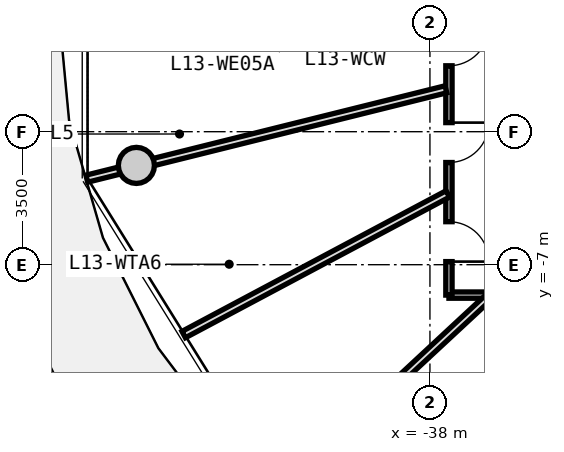
"""IFC4 building model, lengths in metres.
Left out: names, types, materials, properties, quantities, classifications, styles, units other than length and angle.
Written with IfcOpenShell. Run it as: python <this file> out.ifc"""

import sys

from ifc_helpers import new_model, si_unit, direction, frame, frame_2d, origin, origin_2d, place, context, subcontext, project, spatial, rectangle, circle, extrude, source, transform, mapped, element, fill, save


model = new_model("IFC4")
c1 = context("Model", 3, precision=1e-05, world=origin(), true_north=direction((0.0, 1.0)))
c2 = subcontext(c1, "Body", "Model", "MODEL_VIEW")
j1 = project(units=[si_unit("LENGTHUNIT", "METRE"), si_unit("PLANEANGLEUNIT", "RADIAN")], contexts=[c1])
p1 = place(None, origin())
s1 = spatial("IfcSite", under=j1, at=p1, CompositionType="ELEMENT")
p2 = place(p1, origin())
s2 = spatial("IfcBuilding", under=s1, at=p2, CompositionType="ELEMENT")
p3 = place(p2, frame((0.0, 0.0, 46.0)))
s3 = spatial("IfcBuildingStorey", under=s2, at=p3, CompositionType="ELEMENT", Elevation=46.0)
m1 = source(origin(), c2, "Body", "SweptSolid", [
    extrude(circle(Radius=0.475, at=origin_2d()), origin(), (0.0, 0.0, 1.0), 3.05),
])
p4 = place(p3, frame((-45.725, -4.387, 0.0), z_axis=(0.0, 0.0, 1.0), x_axis=(1.0, 0.0, 0.0)))
e1 = element("IfcColumn", 1, at=p4, inside=s3, PredefinedType="COLUMN", context=c2, shape_type="MappedRepresentation", body=[
    mapped(m1, transform((0.0, 0.0, 0.0), x_axis=(1.0, 0.0, 0.0), y_axis=(0.0, 1.0, 0.0), z_axis=(0.0, 0.0, 1.0), scale=1.0)),
])
m2 = source(origin(), c2, "Body", "SweptSolid", [
    extrude(rectangle(XDim=19.0, YDim=0.165, at=frame_2d((9.5, 0.0))), origin(), (0.0, 0.0, 1.0), 2.775),
])
p5 = place(p3, frame((-18.5, -7.8, 0.0), z_axis=(0.0, 0.0, 1.0), x_axis=(-1.0, 0.0, 0.0)))
e2 = element("IfcWall", 2, at=p5, inside=s3, PredefinedType="PARTITIONING", context=c2, shape_type="MappedRepresentation", body=[
    mapped(m2, transform((0.0, 0.0, 0.0), x_axis=(1.0, 0.0, 0.0), y_axis=(0.0, 1.0, 0.0), z_axis=(0.0, 0.0, 1.0), scale=1.0)),
])
p6 = place(p5, frame((15.652, 0.0, 0.0)))
e3 = element("IfcOpeningElement", 3, at=p6, cuts=e2, PredefinedType="OPENING", context=c2, shape_type="SweptSolid", body=[
    extrude(rectangle(XDim=1.05, YDim=2.15, at=frame_2d((0.525, 1.075))), frame((0.0, 0.093, 0.0), z_axis=(0.0, -1.0, 0.0), x_axis=(1.0, 0.0, 0.0)), (0.0, 0.0, 1.0), 0.185),
])
p7 = place(p5, frame((12.5, 0.0, 0.0)))
e4 = element("IfcOpeningElement", 4, at=p7, cuts=e2, PredefinedType="OPENING", context=c2, shape_type="SweptSolid", body=[
    extrude(rectangle(XDim=1.05, YDim=2.15, at=frame_2d((0.525, 1.075))), frame((0.0, 0.093, 0.0), z_axis=(0.0, -1.0, 0.0), x_axis=(1.0, 0.0, 0.0)), (0.0, 0.0, 1.0), 0.185),
])
p8 = place(p5, frame((10.104, 0.0, 0.0)))
e5 = element("IfcOpeningElement", 5, at=p8, cuts=e2, PredefinedType="OPENING", context=c2, shape_type="SweptSolid", body=[
    extrude(rectangle(XDim=1.05, YDim=2.15, at=frame_2d((0.525, 1.075))), frame((0.0, 0.093, 0.0), z_axis=(0.0, -1.0, 0.0), x_axis=(1.0, 0.0, 0.0)), (0.0, 0.0, 1.0), 0.185),
])
p9 = place(p5, frame((7.806, 0.0, 0.0)))
e6 = element("IfcOpeningElement", 6, at=p9, cuts=e2, PredefinedType="OPENING", context=c2, shape_type="SweptSolid", body=[
    extrude(rectangle(XDim=1.05, YDim=2.15, at=frame_2d((0.525, 1.075))), frame((0.0, 0.093, 0.0), z_axis=(0.0, -1.0, 0.0), x_axis=(1.0, 0.0, 0.0)), (0.0, 0.0, 1.0), 0.185),
])
p10 = place(p5, frame((5.915, 0.0, 0.0)))
e7 = element("IfcOpeningElement", 7, at=p10, cuts=e2, PredefinedType="OPENING", context=c2, shape_type="SweptSolid", body=[
    extrude(rectangle(XDim=0.92, YDim=2.1, at=frame_2d((0.46, 1.05))), frame((0.0, 0.093, 0.0), z_axis=(0.0, -1.0, 0.0), x_axis=(1.0, 0.0, 0.0)), (0.0, 0.0, 1.0), 0.185),
])
p11 = place(p5, frame((2.769, 0.0, 0.0)))
e8 = element("IfcOpeningElement", 8, at=p11, cuts=e2, PredefinedType="OPENING", context=c2, shape_type="SweptSolid", body=[
    extrude(rectangle(XDim=0.92, YDim=2.1, at=frame_2d((0.46, 1.05))), frame((0.0, 0.093, 0.0), z_axis=(0.0, -1.0, 0.0), x_axis=(1.0, 0.0, 0.0)), (0.0, 0.0, 1.0), 0.185),
])
m3 = source(origin(), c2, "Body", "SweptSolid", [
    extrude(rectangle(XDim=15.6, YDim=0.165, at=frame_2d((7.8, 0.0))), origin(), (0.0, 0.0, 1.0), 2.775),
])
p12 = place(p3, frame((-37.5, -7.8, 0.0), z_axis=(0.0, 0.0, 1.0), x_axis=(0.0, 1.0, 0.0)))
e9 = element("IfcWall", 9, at=p12, inside=s3, PredefinedType="PARTITIONING", context=c2, shape_type="MappedRepresentation", body=[
    mapped(m3, transform((0.0, 0.0, 0.0), x_axis=(1.0, 0.0, 0.0), y_axis=(0.0, 1.0, 0.0), z_axis=(0.0, 0.0, 1.0), scale=1.0)),
])
p13 = place(p12, frame((13.293, 0.0, 0.0)))
e10 = element("IfcOpeningElement", 10, at=p13, cuts=e9, PredefinedType="OPENING", context=c2, shape_type="SweptSolid", body=[
    extrude(rectangle(XDim=1.05, YDim=2.15, at=frame_2d((0.525, 1.075))), frame((0.0, 0.093, 0.0), z_axis=(0.0, -1.0, 0.0), x_axis=(1.0, 0.0, 0.0)), (0.0, 0.0, 1.0), 0.185),
])
p14 = place(p12, frame((11.018, 0.0, 0.0)))
e11 = element("IfcOpeningElement", 11, at=p14, cuts=e9, PredefinedType="OPENING", context=c2, shape_type="SweptSolid", body=[
    extrude(rectangle(XDim=1.05, YDim=2.15, at=frame_2d((0.525, 1.075))), frame((0.0, 0.093, 0.0), z_axis=(0.0, -1.0, 0.0), x_axis=(1.0, 0.0, 0.0)), (0.0, 0.0, 1.0), 0.185),
])
p15 = place(p12, frame((7.812, 0.0, 0.0)))
e12 = element("IfcOpeningElement", 12, at=p15, cuts=e9, PredefinedType="OPENING", context=c2, shape_type="SweptSolid", body=[
    extrude(rectangle(XDim=1.05, YDim=2.15, at=frame_2d((0.525, 1.075))), frame((0.0, 0.093, 0.0), z_axis=(0.0, -1.0, 0.0), x_axis=(1.0, 0.0, 0.0)), (0.0, 0.0, 1.0), 0.185),
])
p16 = place(p12, frame((6.035, 0.0, 0.0)))
e13 = element("IfcOpeningElement", 13, at=p16, cuts=e9, PredefinedType="OPENING", context=c2, shape_type="SweptSolid", body=[
    extrude(rectangle(XDim=1.05, YDim=2.15, at=frame_2d((0.525, 1.075))), frame((0.0, 0.093, 0.0), z_axis=(0.0, -1.0, 0.0), x_axis=(1.0, 0.0, 0.0)), (0.0, 0.0, 1.0), 0.185),
])
p17 = place(p12, frame((3.489, 0.0, 0.0)))
e14 = element("IfcOpeningElement", 14, at=p17, cuts=e9, PredefinedType="OPENING", context=c2, shape_type="SweptSolid", body=[
    extrude(rectangle(XDim=1.05, YDim=2.15, at=frame_2d((0.525, 1.075))), frame((0.0, 0.093, 0.0), z_axis=(0.0, -1.0, 0.0), x_axis=(1.0, 0.0, 0.0)), (0.0, 0.0, 1.0), 0.185),
])
p18 = place(p12, frame((0.882, 0.0, 0.0)))
e15 = element("IfcOpeningElement", 15, at=p18, cuts=e9, PredefinedType="OPENING", context=c2, shape_type="SweptSolid", body=[
    extrude(rectangle(XDim=1.05, YDim=2.15, at=frame_2d((0.525, 1.075))), frame((0.0, 0.093, 0.0), z_axis=(0.0, -1.0, 0.0), x_axis=(1.0, 0.0, 0.0)), (0.0, 0.0, 1.0), 0.185),
])
m4 = source(origin(), c2, "Body", "SweptSolid", [
    extrude(rectangle(XDim=9.737, YDim=0.19, at=frame_2d((4.869, 0.0))), origin(), (0.0, 0.0, 1.0), 2.225),
])
p19 = place(p3, frame((-37.58, -2.385, 0.0), z_axis=(0.0, 0.0, 1.0), x_axis=(-0.970392716238, -0.241532557375, 0.0)))
e16 = element("IfcWall", 16, at=p19, inside=s3, PredefinedType="PARTITIONING", context=c2, shape_type="MappedRepresentation", body=[
    mapped(m4, transform((0.0, 0.0, 0.0), x_axis=(1.0, 0.0, 0.0), y_axis=(0.0, 1.0, 0.0), z_axis=(0.0, 0.0, 1.0), scale=1.0)),
])
m5 = source(origin(), c2, "Body", "SweptSolid", [
    extrude(rectangle(XDim=7.435, YDim=0.19, at=frame_2d((3.717, 0.0))), origin(), (0.0, 0.0, 1.0), 2.225),
])
p20 = place(p3, frame((-36.483, -7.88, 0.0), z_axis=(0.0, 0.0, 1.0), x_axis=(-0.732651956848, -0.680603489652, 0.0)))
e17 = element("IfcWall", 17, at=p20, inside=s3, PredefinedType="PARTITIONING", context=c2, shape_type="MappedRepresentation", body=[
    mapped(m5, transform((0.0, 0.0, 0.0), x_axis=(1.0, 0.0, 0.0), y_axis=(0.0, 1.0, 0.0), z_axis=(0.0, 0.0, 1.0), scale=1.0)),
])
m6 = source(origin(), c2, "Body", "SweptSolid", [
    extrude(rectangle(XDim=7.873, YDim=0.19, at=frame_2d((3.937, 0.0))), origin(), (0.0, 0.0, 1.0), 2.775),
])
p21 = place(p3, frame((-37.53, -5.138, 0.0), z_axis=(0.0, 0.0, 1.0), x_axis=(-0.882666052726, -0.470000680175, 0.0)))
e18 = element("IfcWall", 18, at=p21, inside=s3, PredefinedType="PARTITIONING", context=c2, shape_type="MappedRepresentation", body=[
    mapped(m6, transform((0.0, 0.0, 0.0), x_axis=(1.0, 0.0, 0.0), y_axis=(0.0, 1.0, 0.0), z_axis=(0.0, 0.0, 1.0), scale=1.0)),
])
m7 = source(origin(), c2, "Body", "SweptSolid", [
    extrude(rectangle(XDim=8.818, YDim=0.19, at=frame_2d((4.409, 0.0))), origin(), (0.0, 0.0, 1.0), 2.775),
])
p22 = place(p3, frame((-32.841, -7.83, 0.0), z_axis=(0.0, 0.0, 1.0), x_axis=(-0.529931746109, -0.848040296487, 0.0)))
e19 = element("IfcWall", 19, at=p22, inside=s3, PredefinedType="PARTITIONING", context=c2, shape_type="MappedRepresentation", body=[
    mapped(m7, transform((0.0, 0.0, 0.0), x_axis=(1.0, 0.0, 0.0), y_axis=(0.0, 1.0, 0.0), z_axis=(0.0, 0.0, 1.0), scale=1.0)),
])
m8 = source(origin(), c2, "Body", "SweptSolid", [
    extrude(rectangle(XDim=1.05, YDim=2.15, at=frame_2d((0.525, 1.075))), frame((0.0, 0.025, 0.0), z_axis=(0.0, -1.0, 0.0), x_axis=(1.0, 0.0, 0.0)), (0.0, 0.0, 1.0), 0.05),
])
p23 = place(p16, frame((1.05, 0.0, 0.0), z_axis=(0.0, 0.0, 1.0), x_axis=(-1.0, 0.0, 0.0)))
e20 = element("IfcDoor", 20, at=p23, inside=s3, OperationType="SINGLE_SWING_LEFT", PredefinedType="DOOR", context=c2, shape_type="MappedRepresentation", body=[
    mapped(m8, transform((0.0, 0.0, 0.0), x_axis=(1.0, 0.0, 0.0), y_axis=(0.0, 1.0, 0.0), z_axis=(0.0, 0.0, 1.0), scale=1.0)),
])
fill(e13, e20)
p24 = place(p17, frame((1.05, 0.0, 0.0), z_axis=(0.0, 0.0, 1.0), x_axis=(-1.0, 0.0, 0.0)))
e21 = element("IfcDoor", 21, at=p24, inside=s3, OperationType="SINGLE_SWING_LEFT", PredefinedType="DOOR", context=c2, shape_type="MappedRepresentation", body=[
    mapped(m8, transform((0.0, 0.0, 0.0), x_axis=(1.0, 0.0, 0.0), y_axis=(0.0, 1.0, 0.0), z_axis=(0.0, 0.0, 1.0), scale=1.0)),
])
fill(e14, e21)
p25 = place(p18, frame((1.05, 0.0, 0.0), z_axis=(0.0, 0.0, 1.0), x_axis=(-1.0, 0.0, 0.0)))
e22 = element("IfcDoor", 22, at=p25, inside=s3, OperationType="SINGLE_SWING_RIGHT", PredefinedType="DOOR", context=c2, shape_type="MappedRepresentation", body=[
    mapped(m8, transform((0.0, 0.0, 0.0), x_axis=(1.0, 0.0, 0.0), y_axis=(0.0, 1.0, 0.0), z_axis=(0.0, 0.0, 1.0), scale=1.0)),
])
fill(e15, e22)
save(model, sys.argv[1])
